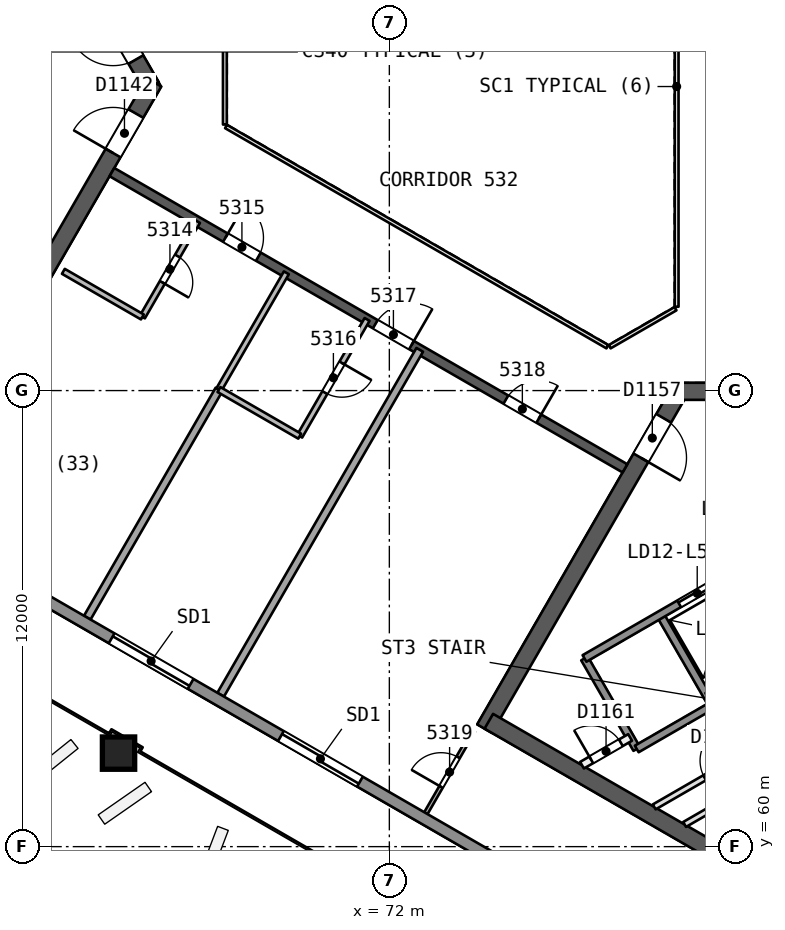
"""IFC4 building model, lengths in metres.
Left out: names, types, materials, properties, quantities, classifications, styles, units other than length and angle.
Written with IfcOpenShell. Run it as: python <this file> out.ifc"""

import sys

from ifc_helpers import new_model, si_unit, direction, frame, frame_2d, origin, origin_2d, place, context, subcontext, project, spatial, rectangle, extrude, element, fill, save


model = new_model("IFC4")
c1 = context("Model", 3, precision=1e-05, world=origin(), true_north=direction((0.0, 1.0)))
c2 = subcontext(c1, "Body", "Model", "MODEL_VIEW")
j1 = project(units=[si_unit("LENGTHUNIT", "METRE"), si_unit("PLANEANGLEUNIT", "RADIAN")], contexts=[c1])
p1 = place(None, origin())
s1 = spatial("IfcSite", under=j1, at=p1, CompositionType="ELEMENT")
p2 = place(p1, origin())
s2 = spatial("IfcBuilding", under=s1, at=p2, CompositionType="ELEMENT")
p3 = place(p2, frame((0.0, 0.0, 216.9)))
s3 = spatial("IfcBuildingStorey", under=s2, at=p3, CompositionType="ELEMENT", Elevation=216.9)
p4 = place(p3, frame((65.74, 80.0, 0.0), z_axis=(0.0, 0.0, 1.0), x_axis=(-0.499991857942, 0.866030104553, 0.0)))
e1 = element("IfcWall", 1, at=p4, inside=s3, PredefinedType="SHEAR", context=c2, shape_type="SweptSolid", body=[
    extrude(rectangle(XDim=10.25, YDim=0.45, at=frame_2d((5.125, 0.0))), origin(), (0.0, 0.0, 1.0), 3.7),
])
p5 = place(p4, frame((0.82, 0.0, 0.0)))
e2 = element("IfcOpeningElement", 2, at=p5, cuts=e1, PredefinedType="OPENING", context=c2, shape_type="SweptSolid", body=[
    extrude(rectangle(XDim=1.2, YDim=2.1, at=frame_2d((0.6, 1.05))), frame((0.0, 0.235, 0.0), z_axis=(0.0, -1.0, 0.0), x_axis=(1.0, 0.0, 0.0)), (0.0, 0.0, 1.0), 0.471),
])
p6 = place(p3, frame((60.728, 71.318, 0.0), z_axis=(0.0, 0.0, 1.0), x_axis=(0.500012416173, 0.866018235185, 0.0)))
e3 = element("IfcWall", 3, at=p6, inside=s3, PredefinedType="SHEAR", context=c2, shape_type="SweptSolid", body=[
    extrude(rectangle(XDim=10.155, YDim=0.45, at=frame_2d((5.078, 0.0))), origin(), (0.0, 0.0, 1.0), 3.7),
])
p7 = place(p6, frame((8.005, 0.0, 0.0)))
e4 = element("IfcOpeningElement", 4, at=p7, cuts=e3, PredefinedType="OPENING", context=c2, shape_type="SweptSolid", body=[
    extrude(rectangle(XDim=1.2, YDim=2.1, at=frame_2d((0.6, 1.05))), frame((0.0, 0.235, 0.0), z_axis=(0.0, -1.0, 0.0), x_axis=(1.0, 0.0, 0.0)), (0.0, 0.0, 1.0), 0.471),
])
p8 = place(p3, frame((79.63, 71.981, 0.0), z_axis=(0.0, 0.0, 1.0), x_axis=(-0.500002171595, -0.86602415001, 0.0)))
e5 = element("IfcWall", 5, at=p8, inside=s3, PredefinedType="SHEAR", context=c2, shape_type="SweptSolid", body=[
    extrude(rectangle(XDim=10.25, YDim=0.45, at=frame_2d((5.125, 0.0))), origin(), (0.0, 0.0, 1.0), 3.7),
])
p9 = place(p8, frame((0.82, 0.0, 0.0)))
e6 = element("IfcOpeningElement", 6, at=p9, cuts=e5, PredefinedType="OPENING", context=c2, shape_type="SweptSolid", body=[
    extrude(rectangle(XDim=1.2, YDim=2.1, at=frame_2d((0.6, 1.05))), frame((0.0, 0.235, 0.0), z_axis=(0.0, -1.0, 0.0), x_axis=(1.0, 0.0, 0.0)), (0.0, 0.0, 1.0), 0.471),
])
p10 = place(p3, frame((74.617, 63.299, 0.0), z_axis=(0.0, 0.0, 1.0), x_axis=(0.86602594008, -0.499999071108, 0.0)))
e7 = element("IfcWall", 7, at=p10, inside=s3, PredefinedType="SHEAR", context=c2, shape_type="SweptSolid", body=[
    extrude(rectangle(XDim=14.108, YDim=0.45, at=frame_2d((7.054, 0.0))), origin(), (0.0, 0.0, 1.0), 3.7),
])
p11 = place(p3, frame((89.655, 71.981, 0.0), z_axis=(0.0, 0.0, 1.0), x_axis=(-1.0, 0.0, 0.0)))
e8 = element("IfcWall", 8, at=p11, inside=s3, PredefinedType="SHEAR", context=c2, shape_type="SweptSolid", body=[
    extrude(rectangle(XDim=10.155, YDim=0.45, at=frame_2d((5.078, 0.0))), origin(), (0.0, 0.0, 1.0), 3.7),
])
p12 = place(p11, frame((8.005, 0.0, 0.0)))
e9 = element("IfcOpeningElement", 9, at=p12, cuts=e8, PredefinedType="OPENING", context=c2, shape_type="SweptSolid", body=[
    extrude(rectangle(XDim=1.2, YDim=2.1, at=frame_2d((0.6, 1.05))), frame((0.0, 0.235, 0.0), z_axis=(0.0, -1.0, 0.0), x_axis=(1.0, 0.0, 0.0)), (0.0, 0.0, 1.0), 0.471),
])
p13 = place(p3, frame((64.7, 77.748, 0.0), z_axis=(0.0, 0.0, 1.0), x_axis=(0.866026492143, -0.499998114903, 0.0)))
e10 = element("IfcWall", 10, at=p13, inside=s3, PredefinedType="SHEAR", context=c2, shape_type="SweptSolid", body=[
    extrude(rectangle(XDim=15.588, YDim=0.25, at=frame_2d((7.794, 0.0))), origin(), (0.0, 0.0, 1.0), 3.3),
])
p14 = place(p13, frame((3.45, 0.0, 0.0)))
e11 = element("IfcOpeningElement", 11, at=p14, cuts=e10, PredefinedType="OPENING", context=c2, shape_type="SweptSolid", body=[
    extrude(rectangle(XDim=1.0, YDim=2.1, at=frame_2d((0.5, 1.05))), frame((0.0, 0.135, 0.0), z_axis=(0.0, -1.0, 0.0), x_axis=(1.0, 0.0, 0.0)), (0.0, 0.0, 1.0), 0.271),
])
p15 = place(p13, frame((8.003, 0.0, 0.0)))
e12 = element("IfcOpeningElement", 12, at=p15, cuts=e10, PredefinedType="OPENING", context=c2, shape_type="SweptSolid", body=[
    extrude(rectangle(XDim=1.1, YDim=2.1, at=frame_2d((0.55, 1.05))), frame((0.0, 0.135, 0.0), z_axis=(0.0, -1.0, 0.0), x_axis=(1.0, 0.0, 0.0)), (0.0, 0.0, 1.0), 0.271),
])
p16 = place(p13, frame((11.971, 0.0, 0.0)))
e13 = element("IfcOpeningElement", 13, at=p16, cuts=e10, PredefinedType="OPENING", context=c2, shape_type="SweptSolid", body=[
    extrude(rectangle(XDim=1.0, YDim=2.1, at=frame_2d((0.5, 1.05))), frame((0.0, 0.135, 0.0), z_axis=(0.0, -1.0, 0.0), x_axis=(1.0, 0.0, 0.0)), (0.0, 0.0, 1.0), 0.271),
])
p17 = place(p3, frame((64.862, 62.44, 0.0), z_axis=(0.010092954999, 0.017481261926, 0.999796248113), x_axis=(-0.866025993948, 0.499998977805, 1.48321e-07)))
e14 = element("IfcColumn", 14, at=p17, inside=s3, PredefinedType="COLUMN", context=c2, shape_type="SweptSolid", body=[
    extrude(rectangle(XDim=0.85, YDim=0.85, at=origin_2d()), origin(), (0.0, 0.0, 1.0), 3.701),
])
p18 = place(p3, frame((66.952, 76.448, 0.0), z_axis=(0.0, 0.0, 1.0), x_axis=(-0.499987231761, -0.866032775405, 0.0)))
e15 = element("IfcWall", 15, at=p18, inside=s3, PredefinedType="PARTITIONING", context=c2, shape_type="SweptSolid", body=[
    extrude(rectangle(XDim=2.9, YDim=0.15, at=frame_2d((1.45, 0.0))), origin(), (0.0, 0.0, 1.0), 3.3),
])
p19 = place(p18, frame((1.05, 0.0, 0.0)))
e16 = element("IfcOpeningElement", 16, at=p19, cuts=e15, PredefinedType="OPENING", context=c2, shape_type="SweptSolid", body=[
    extrude(rectangle(XDim=0.8, YDim=2.1, at=frame_2d((0.4, 1.05))), frame((0.0, 0.085, 0.0), z_axis=(0.0, -1.0, 0.0), x_axis=(1.0, 0.0, 0.0)), (0.0, 0.0, 1.0), 0.171),
])
p20 = place(p3, frame((65.502, 73.937, 0.0), z_axis=(0.0, 0.0, 1.0), x_axis=(-0.865994240961, 0.500053971709, 0.0)))
e17 = element("IfcWall", 17, at=p20, inside=s3, PredefinedType="PARTITIONING", context=c2, shape_type="SweptSolid", body=[
    extrude(rectangle(XDim=2.401, YDim=0.15, at=frame_2d((1.201, 0.0))), origin(), (0.0, 0.0, 1.0), 3.3),
])
p21 = place(p3, frame((64.051, 66.024, 0.0), z_axis=(0.0, 0.0, 1.0), x_axis=(0.499980616072, 0.866036594811, 0.0)))
e18 = element("IfcWall", 18, at=p21, inside=s3, PredefinedType="PARTITIONING", context=c2, shape_type="SweptSolid", body=[
    extrude(rectangle(XDim=6.931, YDim=0.2, at=frame_2d((3.465, 0.0))), origin(), (0.0, 0.0, 1.0), 3.3),
])
p22 = place(p3, frame((67.517, 72.027, 0.0), z_axis=(0.0, 0.0, 1.0), x_axis=(0.500018392462, 0.866014784631, 0.0)))
e19 = element("IfcWall", 19, at=p22, inside=s3, PredefinedType="PARTITIONING", context=c2, shape_type="SweptSolid", body=[
    extrude(rectangle(XDim=3.547, YDim=0.15, at=frame_2d((1.773, 0.0))), origin(), (0.0, 0.0, 1.0), 3.3),
])
p23 = place(p3, frame((71.414, 73.872, 0.0), z_axis=(0.0, 0.0, 1.0), x_axis=(-0.499966764714, -0.866044591335, 0.0)))
e20 = element("IfcWall", 20, at=p23, inside=s3, PredefinedType="PARTITIONING", context=c2, shape_type="SweptSolid", body=[
    extrude(rectangle(XDim=3.547, YDim=0.15, at=frame_2d((1.773, 0.0))), origin(), (0.0, 0.0, 1.0), 3.3),
])
p24 = place(p23, frame((1.323, 0.0, 0.0)))
e21 = element("IfcOpeningElement", 21, at=p24, cuts=e20, PredefinedType="OPENING", context=c2, shape_type="SweptSolid", body=[
    extrude(rectangle(XDim=0.9, YDim=2.1, at=frame_2d((0.45, 1.05))), frame((0.0, 0.085, 0.0), z_axis=(0.0, -1.0, 0.0), x_axis=(1.0, 0.0, 0.0)), (0.0, 0.0, 1.0), 0.171),
])
p25 = place(p3, frame((69.641, 70.8, 0.0), z_axis=(0.0, 0.0, 1.0), x_axis=(-0.866029801145, 0.49999238347, 0.0)))
e22 = element("IfcWall", 22, at=p25, inside=s3, PredefinedType="PARTITIONING", context=c2, shape_type="SweptSolid", body=[
    extrude(rectangle(XDim=2.453, YDim=0.15, at=frame_2d((1.227, 0.0))), origin(), (0.0, 0.0, 1.0), 3.3),
])
p26 = place(p3, frame((67.561, 63.998, 0.0), z_axis=(0.0, 0.0, 1.0), x_axis=(0.500010879287, 0.866019122534, 0.0)))
e23 = element("IfcWall", 23, at=p26, inside=s3, PredefinedType="PARTITIONING", context=c2, shape_type="SweptSolid", body=[
    extrude(rectangle(XDim=10.478, YDim=0.2, at=frame_2d((5.239, 0.0))), origin(), (0.0, 0.0, 1.0), 3.3),
])
p27 = place(p3, frame((72.961, 60.88, 0.0), z_axis=(0.0, 0.0, 1.0), x_axis=(0.499953629774, 0.866052173992, 0.0)))
e24 = element("IfcWall", 24, at=p27, inside=s3, PredefinedType="PARTITIONING", context=c2, shape_type="SweptSolid", body=[
    extrude(rectangle(XDim=2.499, YDim=0.1, at=frame_2d((1.25, 0.0))), origin(), (0.0, 0.0, 1.0), 3.3),
])
p28 = place(p27, frame((0.799, 0.0, 0.0)))
e25 = element("IfcOpeningElement", 25, at=p28, cuts=e24, PredefinedType="OPENING", context=c2, shape_type="SweptSolid", body=[
    extrude(rectangle(XDim=0.9, YDim=2.1, at=frame_2d((0.45, 1.05))), frame((0.0, 0.061, 0.0), z_axis=(0.0, -1.0, 0.0), x_axis=(1.0, 0.0, 0.0)), (0.0, 0.0, 1.0), 0.121),
])
p29 = place(p3, frame((88.21, 51.904, 0.0), z_axis=(0.0, 0.0, 1.0), x_axis=(-0.866024402399, 0.500001734447, 0.0)))
e26 = element("IfcWall", 26, at=p29, inside=s3, PredefinedType="SOLIDWALL", context=c2, shape_type="SweptSolid", body=[
    extrude(rectangle(XDim=50.977, YDim=0.3, at=frame_2d((25.488, 0.0))), origin(), (0.0, 0.0, 1.0), 3.3),
])
p30 = place(p29, frame((24.756, 0.0, 0.0)))
e27 = element("IfcOpeningElement", 27, at=p30, cuts=e26, PredefinedType="OPENING", context=c2, shape_type="SweptSolid", body=[
    extrude(rectangle(XDim=2.4, YDim=2.4, at=frame_2d((1.2, 1.2))), frame((0.0, 0.161, 0.0), z_axis=(0.0, -1.0, 0.0), x_axis=(1.0, 0.0, 0.0)), (0.0, 0.0, 1.0), 0.321),
])
p31 = place(p29, frame((19.612, 0.0, 0.0)))
e28 = element("IfcOpeningElement", 28, at=p31, cuts=e26, PredefinedType="OPENING", context=c2, shape_type="SweptSolid", body=[
    extrude(rectangle(XDim=2.4, YDim=2.4, at=frame_2d((1.2, 1.2))), frame((0.0, 0.161, 0.0), z_axis=(0.0, -1.0, 0.0), x_axis=(1.0, 0.0, 0.0)), (0.0, 0.0, 1.0), 0.321),
])
p32 = place(p29, frame((8.885, 0.0, 0.0)))
e29 = element("IfcOpeningElement", 29, at=p32, cuts=e26, PredefinedType="OPENING", context=c2, shape_type="SweptSolid", body=[
    extrude(rectangle(XDim=2.4, YDim=2.4, at=frame_2d((1.2, 1.2))), frame((0.0, 0.161, 0.0), z_axis=(0.0, -1.0, 0.0), x_axis=(1.0, 0.0, 0.0)), (0.0, 0.0, 1.0), 0.321),
])
p33 = place(p29, frame((38.323, 0.0, 0.0)))
e30 = element("IfcOpeningElement", 30, at=p33, cuts=e26, PredefinedType="OPENING", context=c2, shape_type="SweptSolid", body=[
    extrude(rectangle(XDim=2.4, YDim=2.4, at=frame_2d((1.2, 1.2))), frame((0.0, 0.161, 0.0), z_axis=(0.0, -1.0, 0.0), x_axis=(1.0, 0.0, 0.0)), (0.0, 0.0, 1.0), 0.321),
])
for number, where, z_axis, x_axis in (
    (31, (77.135, 64.952, 0.0), (0.0, 0.0, 1.0), (0.5, -0.866, 0.0)),
    (32, (79.127, 66.102, 0.0), (0.0, 0.0, 1.0), (0.5, -0.866, 0.0)),
):
    element("IfcWall", number, at=place(p3, frame(where, z_axis=z_axis, x_axis=x_axis)), inside=s3, PredefinedType="SOLIDWALL", context=c2, shape_type="SweptSolid", body=[
        extrude(rectangle(XDim=2.75, YDim=0.2, at=frame_2d((1.375, 0.0))), origin(), (0.0, 0.0, 1.0), 3.3),
    ])
p34 = place(p3, frame((77.135, 64.952, 0.0), z_axis=(0.0, 0.0, 1.0), x_axis=(0.866031916153, 0.499988720078, 0.0)))
e33 = element("IfcWall", 33, at=p34, inside=s3, PredefinedType="SOLIDWALL", context=c2, shape_type="SweptSolid", body=[
    extrude(rectangle(XDim=11.35, YDim=0.2, at=frame_2d((5.675, 0.0))), origin(), (0.0, 0.0, 1.0), 3.3),
])
p35 = place(p34, frame((2.875, 0.0, 0.0)))
e34 = element("IfcOpeningElement", 34, at=p35, cuts=e33, PredefinedType="OPENING", context=c2, shape_type="SweptSolid", body=[
    extrude(rectangle(XDim=1.1, YDim=2.1, at=frame_2d((0.55, 1.05))), frame((0.0, 0.11, 0.0), z_axis=(0.0, -1.0, 0.0), x_axis=(1.0, 0.0, 0.0)), (0.0, 0.0, 1.0), 0.221),
])
p36 = place(p34, frame((5.125, 0.0, 0.0)))
e35 = element("IfcOpeningElement", 35, at=p36, cuts=e33, PredefinedType="OPENING", context=c2, shape_type="SweptSolid", body=[
    extrude(rectangle(XDim=1.1, YDim=2.1, at=frame_2d((0.55, 1.05))), frame((0.0, 0.11, 0.0), z_axis=(0.0, -1.0, 0.0), x_axis=(1.0, 0.0, 0.0)), (0.0, 0.0, 1.0), 0.221),
])
p37 = place(p34, frame((7.375, 0.0, 0.0)))
e36 = element("IfcOpeningElement", 36, at=p37, cuts=e33, PredefinedType="OPENING", context=c2, shape_type="SweptSolid", body=[
    extrude(rectangle(XDim=1.1, YDim=2.1, at=frame_2d((0.55, 1.05))), frame((0.0, 0.11, 0.0), z_axis=(0.0, -1.0, 0.0), x_axis=(1.0, 0.0, 0.0)), (0.0, 0.0, 1.0), 0.221),
])
p38 = place(p3, frame((77.07, 62.143, 0.0), z_axis=(0.0, 0.0, 1.0), x_axis=(0.866013036001, 0.500021421018, 0.0)))
e37 = element("IfcWall", 37, at=p38, inside=s3, PredefinedType="PARTITIONING", context=c2, shape_type="SweptSolid", body=[
    extrude(rectangle(XDim=1.461, YDim=0.2, at=frame_2d((0.73, 0.0))), origin(), (0.0, 0.0, 1.0), 3.3),
])
p39 = place(p38, frame((0.281, 0.0, 0.0)))
e38 = element("IfcOpeningElement", 38, at=p39, cuts=e37, PredefinedType="OPENING", context=c2, shape_type="SweptSolid", body=[
    extrude(rectangle(XDim=0.9, YDim=2.1, at=frame_2d((0.45, 1.05))), frame((0.0, 0.11, 0.0), z_axis=(0.0, -1.0, 0.0), x_axis=(1.0, 0.0, 0.0)), (0.0, 0.0, 1.0), 0.221),
])
p40 = place(p3, frame((80.367, 63.954, 0.0), z_axis=(0.0, 0.0, 1.0), x_axis=(0.866026575979, 0.499997969693, 0.0)))
e39 = element("IfcWall", 39, at=p40, inside=s3, PredefinedType="SOLIDWALL", context=c2, shape_type="SweptSolid", body=[
    extrude(rectangle(XDim=6.75, YDim=0.2, at=frame_2d((3.375, 0.0))), origin(), (0.0, 0.0, 1.0), 3.3),
])
p41 = place(p3, frame((78.51, 62.57, 0.0), z_axis=(0.0, 0.0, 1.0), x_axis=(0.866053019151, 0.499952165731, 0.0)))
e40 = element("IfcWall", 40, at=p41, inside=s3, PredefinedType="SOLIDWALL", context=c2, shape_type="SweptSolid", body=[
    extrude(rectangle(XDim=2.3, YDim=0.2, at=frame_2d((1.15, 0.0))), origin(), (0.0, 0.0, 1.0), 3.3),
])
p42 = place(p3, frame((78.97, 61.046, 0.0), z_axis=(0.0, 0.0, 1.0), x_axis=(0.866044057189, 0.499967689963, 0.0)))
e41 = element("IfcWall", 41, at=p42, inside=s3, PredefinedType="PARTITIONING", context=c2, shape_type="SweptSolid", body=[
    extrude(rectangle(XDim=3.964, YDim=0.15, at=frame_2d((1.982, 0.0))), origin(), (0.0, 0.0, 1.0), 3.3),
])
p43 = place(p42, frame((1.532, 0.0, 0.0)))
e42 = element("IfcOpeningElement", 42, at=p43, cuts=e41, PredefinedType="OPENING", context=c2, shape_type="SweptSolid", body=[
    extrude(rectangle(XDim=0.9, YDim=2.1, at=frame_2d((0.45, 1.05))), frame((0.0, 0.085, 0.0), z_axis=(0.0, -1.0, 0.0), x_axis=(1.0, 0.0, 0.0)), (0.0, 0.0, 1.0), 0.171),
])
p44 = place(p3, frame((79.77, 60.584, 0.0), z_axis=(0.0, 0.0, 1.0), x_axis=(0.866021168401, 0.500007335828, 0.0)))
e43 = element("IfcWall", 43, at=p44, inside=s3, PredefinedType="PARTITIONING", context=c2, shape_type="SweptSolid", body=[
    extrude(rectangle(XDim=2.077, YDim=0.15, at=frame_2d((1.039, 0.0))), origin(), (0.0, 0.0, 1.0), 3.3),
])
p45 = place(p3, frame((79.56, 74.206, 0.0), z_axis=(0.0, 0.0, 1.0), x_axis=(0.0, 1.0, 0.0)))
e44 = element("IfcWall", 44, at=p45, inside=s3, PredefinedType="PARTITIONING", context=c2, shape_type="SweptSolid", body=[
    extrude(rectangle(XDim=11.588, YDim=0.1, at=frame_2d((5.794, 0.0))), origin(), (0.0, 0.0, 1.0), 3.3),
])
p46 = place(p3, frame((67.672, 81.0, 0.0), z_axis=(0.0, 0.0, 1.0), x_axis=(0.0, -1.0, 0.0)))
e45 = element("IfcWall", 45, at=p46, inside=s3, PredefinedType="PARTITIONING", context=c2, shape_type="SweptSolid", body=[
    extrude(rectangle(XDim=2.0, YDim=0.1, at=frame_2d((1.0, 0.0))), origin(), (0.0, 0.0, 1.0), 3.3),
])
p47 = place(p3, frame((67.702, 78.948, 0.0), z_axis=(0.0, 0.0, 1.0), x_axis=(0.866026658274, -0.499997827154, 0.0)))
e46 = element("IfcWall", 46, at=p47, inside=s3, PredefinedType="PARTITIONING", context=c2, shape_type="SweptSolid", body=[
    extrude(rectangle(XDim=11.588, YDim=0.1, at=frame_2d((5.794, 0.0))), origin(), (0.0, 0.0, 1.0), 3.3),
])
p48 = place(p3, frame((77.798, 73.154, 0.0), z_axis=(0.0, 0.0, 1.0), x_axis=(0.866041268327, 0.499972520799, 0.0)))
e47 = element("IfcWall", 47, at=p48, inside=s3, PredefinedType="PARTITIONING", context=c2, shape_type="SweptSolid", body=[
    extrude(rectangle(XDim=2.0, YDim=0.1, at=frame_2d((1.0, 0.0))), origin(), (0.0, 0.0, 1.0), 3.3),
])
p49 = place(p19, origin())
e48 = element("IfcDoor", 48, at=p49, inside=s3, OperationType="SINGLE_SWING_RIGHT", PredefinedType="NOTDEFINED", context=c2, shape_type="SweptSolid", body=[
    extrude(rectangle(XDim=0.8, YDim=2.1, at=frame_2d((0.4, 1.05))), frame((0.0, 0.025, 0.0), z_axis=(0.0, -1.0, 0.0), x_axis=(1.0, 0.0, 0.0)), (0.0, 0.0, 1.0), 0.05),
])
fill(e16, e48)
p50 = place(p14, origin())
e49 = element("IfcDoor", 49, at=p50, inside=s3, OperationType="SINGLE_SWING_LEFT", PredefinedType="NOTDEFINED", context=c2, shape_type="SweptSolid", body=[
    extrude(rectangle(XDim=1.0, YDim=2.1, at=frame_2d((0.5, 1.05))), frame((0.0, 0.025, 0.0), z_axis=(0.0, -1.0, 0.0), x_axis=(1.0, 0.0, 0.0)), (0.0, 0.0, 1.0), 0.05),
])
fill(e11, e49)
p51 = place(p24, origin())
e50 = element("IfcDoor", 50, at=p51, inside=s3, OperationType="SINGLE_SWING_LEFT", PredefinedType="NOTDEFINED", context=c2, shape_type="SweptSolid", body=[
    extrude(rectangle(XDim=0.9, YDim=2.1, at=frame_2d((0.45, 1.05))), frame((0.0, 0.025, 0.0), z_axis=(0.0, -1.0, 0.0), x_axis=(1.0, 0.0, 0.0)), (0.0, 0.0, 1.0), 0.05),
])
fill(e21, e50)
p52 = place(p15, origin())
e51 = element("IfcDoor", 51, at=p52, inside=s3, OperationType="SINGLE_SWING_RIGHT", PredefinedType="NOTDEFINED", context=c2, shape_type="SweptSolid", body=[
    extrude(rectangle(XDim=1.1, YDim=2.1, at=frame_2d((0.55, 1.05))), frame((0.0, 0.025, 0.0), z_axis=(0.0, -1.0, 0.0), x_axis=(1.0, 0.0, 0.0)), (0.0, 0.0, 1.0), 0.05),
])
fill(e12, e51)
p53 = place(p16, origin())
e52 = element("IfcDoor", 52, at=p53, inside=s3, OperationType="SINGLE_SWING_RIGHT", PredefinedType="NOTDEFINED", context=c2, shape_type="SweptSolid", body=[
    extrude(rectangle(XDim=1.0, YDim=2.1, at=frame_2d((0.5, 1.05))), frame((0.0, 0.025, 0.0), z_axis=(0.0, -1.0, 0.0), x_axis=(1.0, 0.0, 0.0)), (0.0, 0.0, 1.0), 0.05),
])
fill(e13, e52)
p54 = place(p28, origin())
e53 = element("IfcDoor", 53, at=p54, inside=s3, OperationType="SINGLE_SWING_LEFT", PredefinedType="NOTDEFINED", context=c2, shape_type="SweptSolid", body=[
    extrude(rectangle(XDim=0.9, YDim=2.1, at=frame_2d((0.45, 1.05))), frame((0.0, 0.025, 0.0), z_axis=(0.0, -1.0, 0.0), x_axis=(1.0, 0.0, 0.0)), (0.0, 0.0, 1.0), 0.05),
])
fill(e25, e53)
p55 = place(p30, origin())
e54 = element("IfcDoor", 54, at=p55, inside=s3, OperationType="SLIDING_TO_LEFT", PredefinedType="NOTDEFINED", context=c2, shape_type="SweptSolid", body=[
    extrude(rectangle(XDim=2.4, YDim=2.4, at=frame_2d((1.2, 1.2))), frame((0.0, 0.025, 0.0), z_axis=(0.0, -1.0, 0.0), x_axis=(1.0, 0.0, 0.0)), (0.0, 0.0, 1.0), 0.05),
])
fill(e27, e54)
p56 = place(p31, origin())
e55 = element("IfcDoor", 55, at=p56, inside=s3, OperationType="SLIDING_TO_RIGHT", PredefinedType="NOTDEFINED", context=c2, shape_type="SweptSolid", body=[
    extrude(rectangle(XDim=2.4, YDim=2.4, at=frame_2d((1.2, 1.2))), frame((0.0, 0.025, 0.0), z_axis=(0.0, -1.0, 0.0), x_axis=(1.0, 0.0, 0.0)), (0.0, 0.0, 1.0), 0.05),
])
fill(e28, e55)
p57 = place(p5, origin())
e56 = element("IfcDoor", 56, at=p57, inside=s3, OperationType="SINGLE_SWING_RIGHT", PredefinedType="NOTDEFINED", context=c2, shape_type="SweptSolid", body=[
    extrude(rectangle(XDim=1.2, YDim=2.1, at=frame_2d((0.6, 1.05))), frame((0.0, 0.025, 0.0), z_axis=(0.0, -1.0, 0.0), x_axis=(1.0, 0.0, 0.0)), (0.0, 0.0, 1.0), 0.05),
])
fill(e2, e56)
p58 = place(p7, origin())
e57 = element("IfcDoor", 57, at=p58, inside=s3, OperationType="SINGLE_SWING_LEFT", PredefinedType="NOTDEFINED", context=c2, shape_type="SweptSolid", body=[
    extrude(rectangle(XDim=1.2, YDim=2.1, at=frame_2d((0.6, 1.05))), frame((0.0, 0.025, 0.0), z_axis=(0.0, -1.0, 0.0), x_axis=(1.0, 0.0, 0.0)), (0.0, 0.0, 1.0), 0.05),
])
fill(e4, e57)
p59 = place(p9, origin())
e58 = element("IfcDoor", 58, at=p59, inside=s3, OperationType="SINGLE_SWING_RIGHT", PredefinedType="NOTDEFINED", context=c2, shape_type="SweptSolid", body=[
    extrude(rectangle(XDim=1.2, YDim=2.1, at=frame_2d((0.6, 1.05))), frame((0.0, 0.025, 0.0), z_axis=(0.0, -1.0, 0.0), x_axis=(1.0, 0.0, 0.0)), (0.0, 0.0, 1.0), 0.05),
])
fill(e6, e58)
p60 = place(p35, origin())
e59 = element("IfcDoor", 59, at=p60, inside=s3, OperationType="SLIDING_TO_LEFT", PredefinedType="NOTDEFINED", context=c2, shape_type="SweptSolid", body=[
    extrude(rectangle(XDim=1.1, YDim=2.1, at=frame_2d((0.55, 1.05))), frame((0.0, 0.025, 0.0), z_axis=(0.0, -1.0, 0.0), x_axis=(1.0, 0.0, 0.0)), (0.0, 0.0, 1.0), 0.05),
])
fill(e34, e59)
p61 = place(p43, origin())
e60 = element("IfcDoor", 60, at=p61, inside=s3, OperationType="SINGLE_SWING_RIGHT", PredefinedType="NOTDEFINED", context=c2, shape_type="SweptSolid", body=[
    extrude(rectangle(XDim=0.9, YDim=2.1, at=frame_2d((0.45, 1.05))), frame((0.0, 0.025, 0.0), z_axis=(0.0, -1.0, 0.0), x_axis=(1.0, 0.0, 0.0)), (0.0, 0.0, 1.0), 0.05),
])
fill(e42, e60)
p62 = place(p39, origin())
e61 = element("IfcDoor", 61, at=p62, inside=s3, OperationType="SINGLE_SWING_LEFT", PredefinedType="NOTDEFINED", context=c2, shape_type="SweptSolid", body=[
    extrude(rectangle(XDim=0.9, YDim=2.1, at=frame_2d((0.45, 1.05))), frame((0.0, 0.025, 0.0), z_axis=(0.0, -1.0, 0.0), x_axis=(1.0, 0.0, 0.0)), (0.0, 0.0, 1.0), 0.05),
])
fill(e38, e61)
save(model, sys.argv[1])
